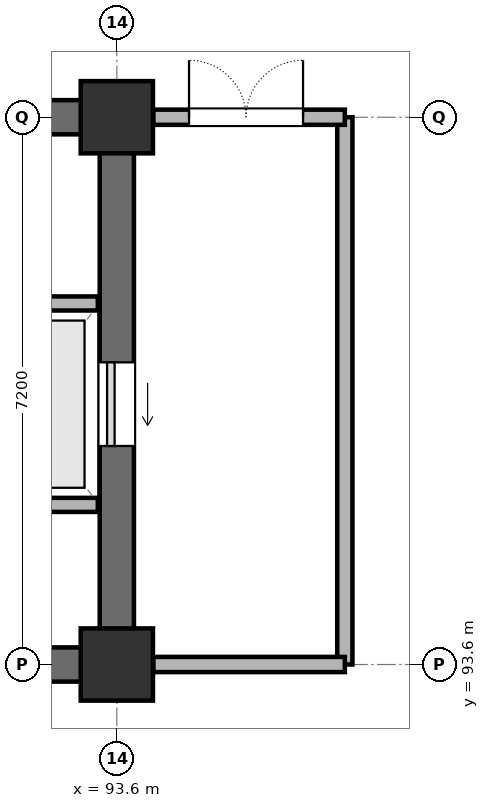
"""IFC4 building model, lengths in metres.
Left out: names, types, materials, properties, quantities, classifications, styles, units other than length and angle.
Written with IfcOpenShell. Run it as: python <this file> out.ifc"""

import sys

from ifc_helpers import new_model, si_unit, direction, frame, frame_2d, origin, origin_2d, place, context, subcontext, project, spatial, rectangle, extrude, element, fill, save


model = new_model("IFC4")
c1 = context("Model", 3, precision=1e-05, world=origin(), true_north=direction((0.0, 1.0)))
c2 = subcontext(c1, "Body", "Model", "MODEL_VIEW")
j1 = project(units=[si_unit("LENGTHUNIT", "METRE"), si_unit("PLANEANGLEUNIT", "RADIAN")], contexts=[c1])
p1 = place(None, origin())
s1 = spatial("IfcSite", under=j1, at=p1, CompositionType="ELEMENT")
p2 = place(p1, origin())
s2 = spatial("IfcBuilding", under=s1, at=p2, CompositionType="ELEMENT")
p3 = place(p2, origin())
s3 = spatial("IfcBuildingStorey", under=s2, at=p3, CompositionType="ELEMENT", Elevation=0.0)
for number, where, z_axis, x_axis in (
    (1, (93.6, 93.6, 0.0), (0.0, 0.0, 1.0), (1.0, 0.0, 0.0)),
    (2, (93.6, 100.8, 0.0), (0.0, 0.0, 1.0), (1.0, 0.0, 0.0)),
):
    element("IfcColumn", number, at=place(p3, frame(where, z_axis=z_axis, x_axis=x_axis)), inside=s3, PredefinedType="COLUMN", context=c2, shape_type="SweptSolid", body=[
        extrude(rectangle(XDim=0.95, YDim=0.95, at=origin_2d()), origin(), (0.0, 0.0, 1.0), 5.4),
    ])
p4 = place(p3, frame((86.75, 93.6, 0.0), z_axis=(0.0, 0.0, 1.0), x_axis=(1.0, 0.0, 0.0)))
e3 = element("IfcWall", 3, at=p4, inside=s3, PredefinedType="SHEAR", context=c2, shape_type="SweptSolid", body=[
    extrude(rectangle(XDim=6.5, YDim=0.45, at=frame_2d((3.25, 0.0))), origin(), (0.0, 0.0, 1.0), 5.4),
])
p5 = place(p3, frame((93.6, 93.95, 0.0), z_axis=(0.0, 0.0, 1.0), x_axis=(0.0, 1.0, 0.0)))
e4 = element("IfcWall", 4, at=p5, inside=s3, PredefinedType="SHEAR", context=c2, shape_type="SweptSolid", body=[
    extrude(rectangle(XDim=6.5, YDim=0.45, at=frame_2d((3.25, 0.0))), origin(), (0.0, 0.0, 1.0), 5.4),
])
p6 = place(p5, frame((2.525, 0.0, 0.0)))
e5 = element("IfcOpeningElement", 5, at=p6, cuts=e4, PredefinedType="OPENING", context=c2, shape_type="SweptSolid", body=[
    extrude(rectangle(XDim=1.1, YDim=2.2, at=frame_2d((0.55, 1.1))), frame((0.0, 0.235, 0.0), z_axis=(0.0, -1.0, 0.0), x_axis=(1.0, 0.0, 0.0)), (0.0, 0.0, 1.0), 0.47),
])
p7 = place(p3, frame((93.25, 100.8, 0.0), z_axis=(0.0, 0.0, 1.0), x_axis=(-1.0, 0.0, 0.0)))
e6 = element("IfcWall", 6, at=p7, inside=s3, PredefinedType="SHEAR", context=c2, shape_type="SweptSolid", body=[
    extrude(rectangle(XDim=6.5, YDim=0.45, at=frame_2d((3.25, 0.0))), origin(), (0.0, 0.0, 1.0), 5.4),
])
p8 = place(p7, frame((3.6, 0.0, 0.0)))
e7 = element("IfcOpeningElement", 7, at=p8, cuts=e6, PredefinedType="OPENING", context=c2, shape_type="SweptSolid", body=[
    extrude(rectangle(XDim=1.2, YDim=2.2, at=frame_2d((0.6, 1.1))), frame((0.0, 0.235, 0.0), z_axis=(0.0, -1.0, 0.0), x_axis=(1.0, 0.0, 0.0)), (0.0, 0.0, 1.0), 0.47),
])
for number, where, z_axis, x_axis in (
    (8, (91.25, 95.7, 0.0), (0.0, 0.0, 1.0), (1.0, 0.0, 0.0)),
    (9, (91.25, 98.35, 0.0), (0.0, 0.0, 1.0), (1.0, 0.0, 0.0)),
):
    element("IfcWall", number, at=place(p3, frame(where, z_axis=z_axis, x_axis=x_axis)), inside=s3, PredefinedType="PARTITIONING", context=c2, shape_type="SweptSolid", body=[
        extrude(rectangle(XDim=2.1, YDim=0.185, at=frame_2d((1.05, 0.0))), origin(), (0.0, 0.0, 1.0), 5.4),
    ])
p9 = place(p3, frame((96.6, 93.6, 0.0), z_axis=(0.0, 0.0, 1.0), x_axis=(0.0, 1.0, 0.0)))
e10 = element("IfcWall", 10, at=p9, inside=s3, PredefinedType="PARTITIONING", context=c2, shape_type="SweptSolid", body=[
    extrude(rectangle(XDim=7.2, YDim=0.2, at=frame_2d((3.6, 0.0))), origin(), (0.0, 0.0, 1.0), 4.12),
])
p10 = place(p3, frame((94.08, 93.6, 0.0), z_axis=(0.0, 0.0, 1.0), x_axis=(1.0, 0.0, 0.0)))
e11 = element("IfcWall", 11, at=p10, inside=s3, PredefinedType="PARTITIONING", context=c2, shape_type="SweptSolid", body=[
    extrude(rectangle(XDim=2.52, YDim=0.2, at=frame_2d((1.26, 0.0))), origin(), (0.0, 0.0, 1.0), 4.12),
])
p11 = place(p3, frame((96.6, 100.8, 0.0), z_axis=(0.0, 0.0, 1.0), x_axis=(-1.0, 0.0, 0.0)))
e12 = element("IfcWall", 12, at=p11, inside=s3, PredefinedType="PARTITIONING", context=c2, shape_type="SweptSolid", body=[
    extrude(rectangle(XDim=2.52, YDim=0.2, at=frame_2d((1.26, 0.0))), origin(), (0.0, 0.0, 1.0), 4.12),
])
p12 = place(p11, frame((0.55, 0.0, 0.0)))
e13 = element("IfcOpeningElement", 13, at=p12, cuts=e12, PredefinedType="OPENING", context=c2, shape_type="SweptSolid", body=[
    extrude(rectangle(XDim=1.5, YDim=2.2, at=frame_2d((0.75, 1.1))), frame((0.0, 0.11, 0.0), z_axis=(0.0, -1.0, 0.0), x_axis=(1.0, 0.0, 0.0)), (0.0, 0.0, 1.0), 0.22),
])
p13 = place(p6, origin())
e14 = element("IfcDoor", 14, at=p13, inside=s3, OperationType="SLIDING_TO_LEFT", PredefinedType="DOOR", context=c2, shape_type="SweptSolid", body=[
    extrude(rectangle(XDim=1.1, YDim=2.2, at=frame_2d((0.55, 1.1))), frame((0.0, 0.025, 0.0), z_axis=(0.0, -1.0, 0.0), x_axis=(1.0, 0.0, 0.0)), (0.0, 0.0, 1.0), 0.05),
])
fill(e5, e14)
p14 = place(p12, frame((1.5, 0.0, 0.0), z_axis=(0.0, 0.0, 1.0), x_axis=(-1.0, 0.0, 0.0)))
e15 = element("IfcDoor", 15, at=p14, inside=s3, OperationType="DOUBLE_DOOR_SINGLE_SWING", PredefinedType="DOOR", context=c2, shape_type="SweptSolid", body=[
    extrude(rectangle(XDim=1.5, YDim=2.2, at=frame_2d((0.75, 1.1))), frame((0.0, 0.025, 0.0), z_axis=(0.0, -1.0, 0.0), x_axis=(1.0, 0.0, 0.0)), (0.0, 0.0, 1.0), 0.05),
])
fill(e13, e15)
save(model, sys.argv[1])
